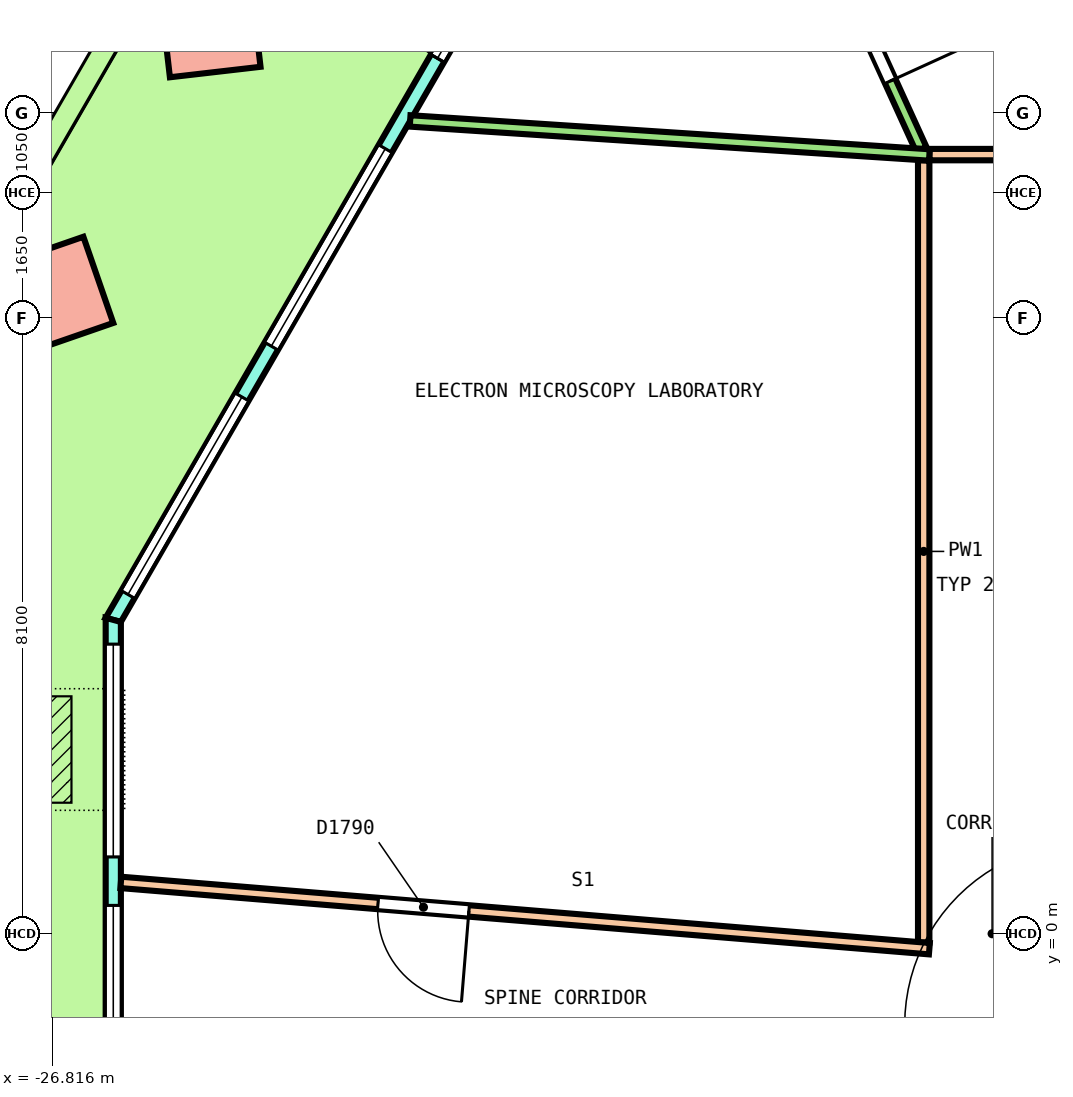
"""IFC4 building model, lengths in metres.
Left out: names, types, materials, properties, quantities, classifications, styles, units other than length and angle.
Written with IfcOpenShell. Run it as: python <this file> out.ifc"""

import sys

from ifc_helpers import new_model, si_unit, direction, frame, frame_2d, origin, origin_2d, place, context, subcontext, project, spatial, polyline, rectangle, outline, extrude, element, fill, save


model = new_model("IFC4")
c1 = context("Model", 3, precision=1e-05, world=origin(), true_north=direction((0.0, 1.0)))
c2 = subcontext(c1, "Body", "Model", "MODEL_VIEW")
j1 = project(units=[si_unit("LENGTHUNIT", "METRE"), si_unit("PLANEANGLEUNIT", "RADIAN")], contexts=[c1])
p1 = place(None, origin())
s1 = spatial("IfcSite", under=j1, at=p1, CompositionType="ELEMENT")
p2 = place(p1, origin())
s2 = spatial("IfcBuilding", under=s1, at=p2, CompositionType="ELEMENT")
p3 = place(p2, frame((0.0, 0.0, 167.2)))
s3 = spatial("IfcBuildingStorey", under=s2, at=p3, CompositionType="ELEMENT", Elevation=167.2)
p4 = place(p3, frame((-24.74, 11.932, 0.0), z_axis=(-0.025365582388, 0.018858497119, 0.999500347332), x_axis=(-0.500693070331, -0.865617296359, 0.003625681545)))
e1 = element("IfcColumn", 1, at=p4, inside=s3, PredefinedType="COLUMN", context=c2, shape_type="SweptSolid", body=[
    extrude(rectangle(XDim=1.2, YDim=1.2, at=origin_2d()), origin(), (0.0, 0.0, 1.0), 4.052),
])
p5 = place(p3, frame((-26.776, 8.406, 0.0), z_axis=(-0.021749357258, 0.025183466299, 0.999446225909), x_axis=(-0.501141721156, -0.865296605573, 0.010897692434)))
e2 = element("IfcColumn", 2, at=p5, inside=s3, PredefinedType="COLUMN", context=c2, shape_type="SweptSolid", body=[
    extrude(rectangle(XDim=1.2, YDim=1.2, at=origin_2d()), origin(), (0.0, 0.0, 1.0), 4.052),
])
p6 = place(p3, frame((-16.582, 20.463, 0.0), z_axis=(0.0, 0.0, 1.0), x_axis=(-0.499999588275, -0.866025641494, 0.0)))
e3 = element("IfcWall", 3, at=p6, inside=s3, PredefinedType="SOLIDWALL", context=c2, shape_type="SweptSolid", body=[
    extrude(outline(polyline([(-0.027, -0.1), (1.024, -0.1), (2.075, -0.1), (3.125, -0.1), (4.176, -0.1), (5.227, -0.1), (6.278, -0.1), (7.329, -0.1), (8.38, -0.1), (9.43, -0.1), (10.481, -0.1), (11.532, -0.1), (12.583, -0.1), (13.634, -0.1), (14.685, -0.1), (15.735, -0.1), (16.786, -0.1), (17.837, -0.1), (18.888, -0.1), (18.834, 0.1), (17.789, 0.1), (16.744, 0.1), (15.699, 0.1), (14.655, 0.1), (13.61, 0.1), (12.565, 0.1), (11.52, 0.1), (10.475, 0.1), (9.43, 0.1), (8.385, 0.1), (7.341, 0.1), (6.296, 0.1), (5.251, 0.1), (4.206, 0.1), (3.161, 0.1), (2.116, 0.1), (1.072, 0.1), (0.027, 0.1), (-0.027, -0.1)])), origin(), (0.0, 0.0, 1.0), 4.1),
])
p7 = place(p6, frame((0.386, 0.0, 0.1)))
e4 = element("IfcOpeningElement", 4, at=p7, cuts=e3, PredefinedType="OPENING", context=c2, shape_type="SweptSolid", body=[
    extrude(rectangle(XDim=3.0, YDim=2.9, at=frame_2d((1.5, 1.45))), frame((0.0, 0.11, 0.0), z_axis=(0.0, -1.0, 0.0), x_axis=(1.0, 0.0, 0.0)), (0.0, 0.0, 1.0), 0.22),
])
p8 = place(p6, frame((4.158, 0.0, 0.1)))
e5 = element("IfcOpeningElement", 5, at=p8, cuts=e3, PredefinedType="OPENING", context=c2, shape_type="SweptSolid", body=[
    extrude(rectangle(XDim=3.0, YDim=2.9, at=frame_2d((1.5, 1.45))), frame((0.0, 0.11, 0.0), z_axis=(0.0, -1.0, 0.0), x_axis=(1.0, 0.0, 0.0)), (0.0, 0.0, 1.0), 0.22),
])
p9 = place(p6, frame((8.531, 0.0, 0.0)))
e6 = element("IfcOpeningElement", 6, at=p9, cuts=e3, PredefinedType="OPENING", context=c2, shape_type="SweptSolid", body=[
    extrude(rectangle(XDim=1.8, YDim=2.4, at=frame_2d((0.9, 1.2))), frame((0.0, 0.11, 0.0), z_axis=(0.0, -1.0, 0.0), x_axis=(1.0, 0.0, 0.0)), (0.0, 0.0, 1.0), 0.22),
])
p10 = place(p6, frame((8.531, 0.0, 2.55)))
e7 = element("IfcOpeningElement", 7, at=p10, cuts=e3, PredefinedType="OPENING", context=c2, shape_type="SweptSolid", body=[
    extrude(rectangle(XDim=1.8, YDim=0.45, at=frame_2d((0.9, 0.225))), frame((0.0, 0.11, 0.0), z_axis=(0.0, -1.0, 0.0), x_axis=(1.0, 0.0, 0.0)), (0.0, 0.0, 1.0), 0.22),
])
p11 = place(p6, frame((11.703, 0.0, 0.1)))
e8 = element("IfcOpeningElement", 8, at=p11, cuts=e3, PredefinedType="OPENING", context=c2, shape_type="SweptSolid", body=[
    extrude(rectangle(XDim=3.0, YDim=2.9, at=frame_2d((1.5, 1.45))), frame((0.0, 0.11, 0.0), z_axis=(0.0, -1.0, 0.0), x_axis=(1.0, 0.0, 0.0)), (0.0, 0.0, 1.0), 0.22),
])
p12 = place(p6, frame((15.475, 0.0, 0.1)))
e9 = element("IfcOpeningElement", 9, at=p12, cuts=e3, PredefinedType="OPENING", context=c2, shape_type="SweptSolid", body=[
    extrude(rectangle(XDim=3.0, YDim=2.9, at=frame_2d((1.5, 1.45))), frame((0.0, 0.11, 0.0), z_axis=(0.0, -1.0, 0.0), x_axis=(1.0, 0.0, 0.0)), (0.0, 0.0, 1.0), 0.22),
])
p13 = place(p3, frame((-26.012, 4.129, 0.0), z_axis=(0.0, 0.0, 1.0), x_axis=(0.0, -1.0, 0.0)))
e10 = element("IfcWall", 10, at=p13, inside=s3, PredefinedType="SOLIDWALL", context=c2, shape_type="SweptSolid", body=[
    extrude(outline(polyline([(-0.027, -0.1), (1.128, -0.1), (2.282, -0.1), (3.437, -0.1), (4.592, -0.1), (5.747, -0.1), (6.901, -0.1), (6.848, 0.1), (5.711, 0.1), (4.574, 0.1), (3.437, 0.1), (2.301, 0.1), (1.164, 0.1), (0.027, 0.1), (-0.027, -0.1)])), origin(), (0.0, 0.0, 1.0), 4.1),
])
p14 = place(p13, frame((0.319, 0.0, 0.1)))
e11 = element("IfcOpeningElement", 11, at=p14, cuts=e10, PredefinedType="OPENING", context=c2, shape_type="SweptSolid", body=[
    extrude(rectangle(XDim=2.8, YDim=2.9, at=frame_2d((1.4, 1.45))), frame((0.0, 0.11, 0.0), z_axis=(0.0, -1.0, 0.0), x_axis=(1.0, 0.0, 0.0)), (0.0, 0.0, 1.0), 0.22),
])
p15 = place(p13, frame((3.756, 0.0, 0.1)))
e12 = element("IfcOpeningElement", 12, at=p15, cuts=e10, PredefinedType="OPENING", context=c2, shape_type="SweptSolid", body=[
    extrude(rectangle(XDim=2.8, YDim=2.9, at=frame_2d((1.4, 1.45))), frame((0.0, 0.11, 0.0), z_axis=(0.0, -1.0, 0.0), x_axis=(1.0, 0.0, 0.0)), (0.0, 0.0, 1.0), 0.22),
])
p16 = place(p3, frame((-15.275, 10.25, 0.0), z_axis=(0.0, 0.0, 1.0), x_axis=(1.0, 0.0, 0.0)))
e13 = element("IfcWall", 13, at=p16, inside=s3, PredefinedType="PARTITIONING", context=c2, shape_type="SweptSolid", body=[
    extrude(rectangle(XDim=30.55, YDim=0.15, at=frame_2d((15.275, 0.0))), origin(), (0.0, 0.0, 1.0), 3.05),
])
p17 = place(p16, frame((27.029, 0.0, 0.0)))
e14 = element("IfcOpeningElement", 14, at=p17, cuts=e13, PredefinedType="OPENING", context=c2, shape_type="SweptSolid", body=[
    extrude(rectangle(XDim=1.0, YDim=2.1, at=frame_2d((0.5, 1.05))), frame((0.0, 0.085, 0.0), z_axis=(0.0, -1.0, 0.0), x_axis=(1.0, 0.0, 0.0)), (0.0, 0.0, 1.0), 0.17),
])
p18 = place(p16, frame((14.675, 0.0, 0.0)))
e15 = element("IfcOpeningElement", 15, at=p18, cuts=e13, PredefinedType="OPENING", context=c2, shape_type="SweptSolid", body=[
    extrude(rectangle(XDim=1.2, YDim=2.1, at=frame_2d((0.6, 1.05))), frame((0.0, 0.085, 0.0), z_axis=(0.0, -1.0, 0.0), x_axis=(1.0, 0.0, 0.0)), (0.0, 0.0, 1.0), 0.17),
])
p19 = place(p16, frame((2.222, 0.0, 0.0)))
e16 = element("IfcOpeningElement", 16, at=p19, cuts=e13, PredefinedType="OPENING", context=c2, shape_type="SweptSolid", body=[
    extrude(rectangle(XDim=1.0, YDim=2.1, at=frame_2d((0.5, 1.05))), frame((0.0, 0.085, 0.0), z_axis=(0.0, -1.0, 0.0), x_axis=(1.0, 0.0, 0.0)), (0.0, 0.0, 1.0), 0.17),
])
p20 = place(p3, frame((-15.35, -0.116, 0.0), z_axis=(0.0, 0.0, 1.0), x_axis=(0.0, 1.0, 0.0)))
e17 = element("IfcWall", 17, at=p20, inside=s3, PredefinedType="PARTITIONING", context=c2, shape_type="SweptSolid", body=[
    extrude(rectangle(XDim=10.291, YDim=0.15, at=frame_2d((5.146, 0.0))), origin(), (0.0, 0.0, 1.0), 3.05),
])
p21 = place(p3, frame((-25.912, 0.675, 0.0), z_axis=(0.0, 0.0, 1.0), x_axis=(0.996657796031, -0.081689886835, 0.0)))
e18 = element("IfcWall", 18, at=p21, inside=s3, PredefinedType="PARTITIONING", context=c2, shape_type="SweptSolid", body=[
    extrude(rectangle(XDim=10.672, YDim=0.15, at=frame_2d((5.336, 0.0))), origin(), (0.0, 0.0, 1.0), 3.05),
])
p22 = place(p21, frame((3.394, 0.0, 0.0)))
e19 = element("IfcOpeningElement", 19, at=p22, cuts=e18, PredefinedType="OPENING", context=c2, shape_type="SweptSolid", body=[
    extrude(rectangle(XDim=1.2, YDim=2.1, at=frame_2d((0.6, 1.05))), frame((0.0, 0.085, 0.0), z_axis=(0.0, -1.0, 0.0), x_axis=(1.0, 0.0, 0.0)), (0.0, 0.0, 1.0), 0.17),
])
p23 = place(p3, frame((-18.444, 17.036, 0.0), z_axis=(0.0, 0.0, 1.0), x_axis=(0.414866403237, -0.909882337154, 0.0)))
e20 = element("IfcWall", 20, at=p23, inside=s3, PredefinedType="PARTITIONING", context=c2, shape_type="SweptSolid", body=[
    extrude(rectangle(XDim=7.384, YDim=0.15, at=frame_2d((3.692, 0.0))), origin(), (0.0, 0.0, 1.0), 3.05),
])
p24 = place(p23, frame((5.396, 0.0, 0.0)))
e21 = element("IfcOpeningElement", 21, at=p24, cuts=e20, PredefinedType="OPENING", context=c2, shape_type="SweptSolid", body=[
    extrude(rectangle(XDim=1.0, YDim=2.1, at=frame_2d((0.5, 1.05))), frame((0.0, 0.085, 0.0), z_axis=(0.0, -1.0, 0.0), x_axis=(1.0, 0.0, 0.0)), (0.0, 0.0, 1.0), 0.17),
])
p25 = place(p3, frame((-22.107, 10.693, 0.0), z_axis=(0.0, 0.0, 1.0), x_axis=(0.997856681849, -0.065437317247, 0.0)))
e22 = element("IfcWall", 22, at=p25, inside=s3, PredefinedType="PARTITIONING", context=c2, shape_type="SweptSolid", body=[
    extrude(rectangle(XDim=6.846, YDim=0.15, at=frame_2d((3.423, 0.0))), origin(), (0.0, 0.0, 1.0), 3.05),
])
p26 = place(p9, origin())
e23 = element("IfcDoor", 23, at=p26, inside=s3, OperationType="DOUBLE_DOOR_SINGLE_SWING", PredefinedType="DOOR", context=c2, shape_type="SweptSolid", body=[
    extrude(rectangle(XDim=1.8, YDim=2.4, at=frame_2d((0.9, 1.2))), frame((0.0, 0.025, 0.0), z_axis=(0.0, -1.0, 0.0), x_axis=(1.0, 0.0, 0.0)), (0.0, 0.0, 1.0), 0.05),
])
fill(e6, e23)
p27 = place(p10, origin())
e24 = element("IfcWindow", 24, at=p27, inside=s3, PartitioningType="SINGLE_PANEL", PredefinedType="WINDOW", context=c2, shape_type="SweptSolid", body=[
    extrude(rectangle(XDim=1.8, YDim=0.45, at=frame_2d((0.9, 0.225))), frame((0.0, 0.03, 0.0), z_axis=(0.0, -1.0, 0.0), x_axis=(1.0, 0.0, 0.0)), (0.0, 0.0, 1.0), 0.06),
])
fill(e7, e24)
p28 = place(p11, origin())
e25 = element("IfcWindow", 25, at=p28, inside=s3, PartitioningType="SINGLE_PANEL", PredefinedType="WINDOW", context=c2, shape_type="SweptSolid", body=[
    extrude(rectangle(XDim=3.0, YDim=2.9, at=frame_2d((1.5, 1.45))), frame((0.0, 0.03, 0.0), z_axis=(0.0, -1.0, 0.0), x_axis=(1.0, 0.0, 0.0)), (0.0, 0.0, 1.0), 0.06),
])
fill(e8, e25)
p29 = place(p12, origin())
e26 = element("IfcWindow", 26, at=p29, inside=s3, PartitioningType="SINGLE_PANEL", PredefinedType="WINDOW", context=c2, shape_type="SweptSolid", body=[
    extrude(rectangle(XDim=3.0, YDim=2.9, at=frame_2d((1.5, 1.45))), frame((0.0, 0.03, 0.0), z_axis=(0.0, -1.0, 0.0), x_axis=(1.0, 0.0, 0.0)), (0.0, 0.0, 1.0), 0.06),
])
fill(e9, e26)
p30 = place(p14, origin())
e27 = element("IfcWindow", 27, at=p30, inside=s3, PartitioningType="SINGLE_PANEL", PredefinedType="WINDOW", context=c2, shape_type="SweptSolid", body=[
    extrude(rectangle(XDim=2.8, YDim=2.9, at=frame_2d((1.4, 1.45))), frame((0.0, 0.03, 0.0), z_axis=(0.0, -1.0, 0.0), x_axis=(1.0, 0.0, 0.0)), (0.0, 0.0, 1.0), 0.06),
])
fill(e11, e27)
p31 = place(p15, origin())
e28 = element("IfcWindow", 28, at=p31, inside=s3, PartitioningType="SINGLE_PANEL", PredefinedType="WINDOW", context=c2, shape_type="SweptSolid", body=[
    extrude(rectangle(XDim=2.8, YDim=2.9, at=frame_2d((1.4, 1.45))), frame((0.0, 0.03, 0.0), z_axis=(0.0, -1.0, 0.0), x_axis=(1.0, 0.0, 0.0)), (0.0, 0.0, 1.0), 0.06),
])
fill(e12, e28)
p32 = place(p24, origin())
e29 = element("IfcDoor", 29, at=p32, inside=s3, OperationType="SINGLE_SWING_RIGHT", PredefinedType="DOOR", context=c2, shape_type="SweptSolid", body=[
    extrude(rectangle(XDim=1.0, YDim=2.1, at=frame_2d((0.5, 1.05))), frame((0.0, 0.025, 0.0), z_axis=(0.0, -1.0, 0.0), x_axis=(1.0, 0.0, 0.0)), (0.0, 0.0, 1.0), 0.05),
])
fill(e21, e29)
p33 = place(p22, origin())
e30 = element("IfcDoor", 30, at=p33, inside=s3, OperationType="DOUBLE_DOOR_SINGLE_SWING", PredefinedType="DOOR", context=c2, shape_type="SweptSolid", body=[
    extrude(rectangle(XDim=1.2, YDim=2.1, at=frame_2d((0.6, 1.05))), frame((0.0, 0.025, 0.0), z_axis=(0.0, -1.0, 0.0), x_axis=(1.0, 0.0, 0.0)), (0.0, 0.0, 1.0), 0.05),
])
fill(e19, e30)
save(model, sys.argv[1])
